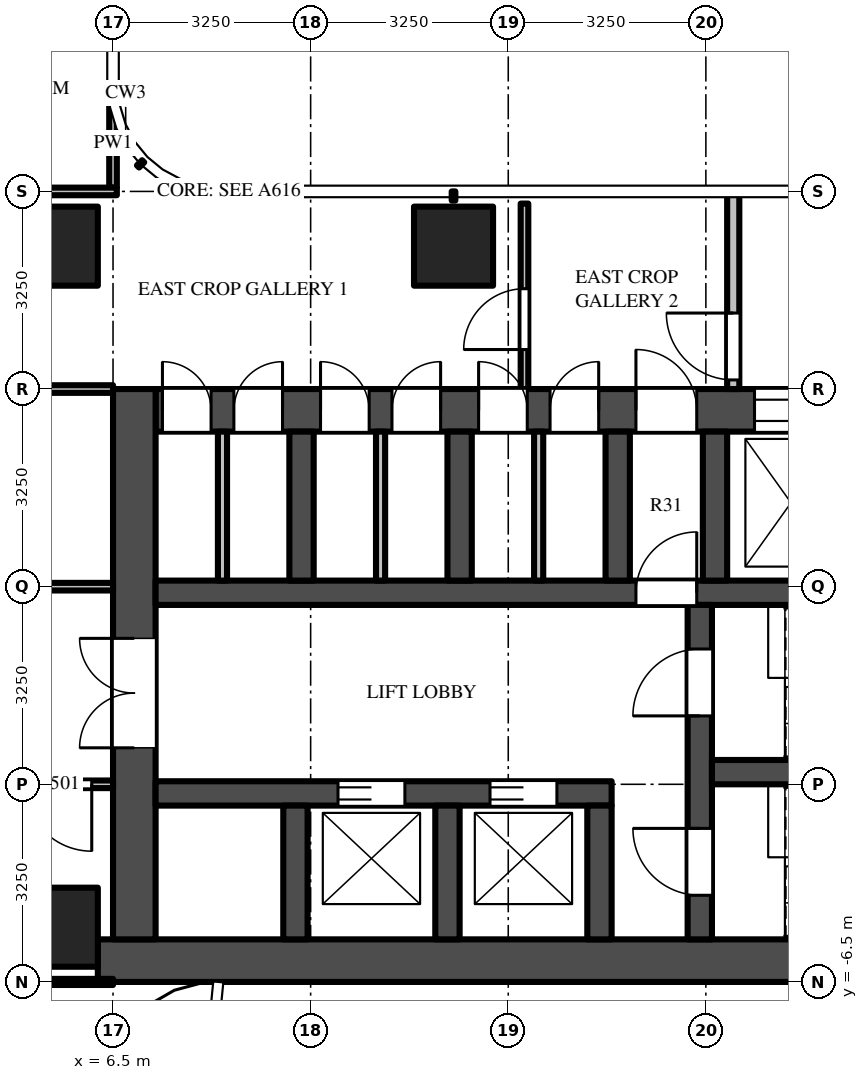
"""IFC4 building model, lengths in metres.
Left out: names, types, materials, properties, quantities, classifications, styles, units other than length and angle.
Written with IfcOpenShell. Run it as: python <this file> out.ifc"""

import sys

from ifc_helpers import new_model, si_unit, direction, frame, frame_2d, origin, origin_2d, place, context, subcontext, project, spatial, rectangle, extrude, source, transform, mapped, element, fill, save


model = new_model("IFC4")
c1 = context("Model", 3, precision=1e-05, world=origin(), true_north=direction((0.0, 1.0)))
c2 = subcontext(c1, "Body", "Model", "MODEL_VIEW")
j1 = project(units=[si_unit("LENGTHUNIT", "METRE"), si_unit("PLANEANGLEUNIT", "RADIAN")], contexts=[c1])
p1 = place(None, origin())
s1 = spatial("IfcSite", under=j1, at=p1, CompositionType="ELEMENT")
p2 = place(p1, origin())
s2 = spatial("IfcBuilding", under=s1, at=p2, CompositionType="ELEMENT")
p3 = place(p2, frame((0.0, 0.0, 138.0)))
s3 = spatial("IfcBuildingStorey", under=s2, at=p3, CompositionType="ELEMENT", Elevation=138.0)
m1 = source(origin(), c2, "Body", "SweptSolid", [
    extrude(rectangle(XDim=1.3, YDim=1.3, at=origin_2d()), origin(), (0.0, 0.0, 1.0), 4.5),
])
for number, where, z_axis, x_axis in (
    (1, (12.1, 5.6, 0.0), (0.0, 0.0, 1.0), (1.0, 0.0, 0.0)),
    (2, (5.6, 5.6, 0.0), (0.0, 0.0, 1.0), (1.0, 0.0, 0.0)),
    (3, (5.6, -5.6, 0.0), (0.0, 0.0, 1.0), (1.0, 0.0, 0.0)),
):
    element("IfcColumn", number, at=place(p3, frame(where, z_axis=z_axis, x_axis=x_axis)), inside=s3, PredefinedType="COLUMN", context=c2, shape_type="MappedRepresentation", body=[
        mapped(m1, transform((0.0, 0.0, 0.0))),
    ])
m2 = source(origin(), c2, "Body", "SweptSolid", [
    extrude(rectangle(XDim=16.5, YDim=0.7, at=frame_2d((8.25, 0.0))), origin(), (0.0, 0.0, 1.0), 4.25),
])
p4 = place(p3, frame((6.25, -6.15, 0.0), z_axis=(0.0, 0.0, 1.0), x_axis=(1.0, 0.0, 0.0)))
e4 = element("IfcWall", 4, at=p4, inside=s3, PredefinedType="SHEAR", context=c2, shape_type="MappedRepresentation", body=[
    mapped(m2, transform((0.0, 0.0, 0.0))),
])
m3 = source(origin(), c2, "Body", "SweptSolid", [
    extrude(rectangle(XDim=14.85, YDim=0.7, at=frame_2d((7.425, 0.0))), origin(), (0.0, 0.0, 1.0), 4.25),
])
p5 = place(p3, frame((7.2, 2.9, 0.0), z_axis=(0.0, 0.0, 1.0), x_axis=(1.0, 0.0, 0.0)))
e5 = element("IfcWall", 5, at=p5, inside=s3, PredefinedType="SHEAR", context=c2, shape_type="MappedRepresentation", body=[
    mapped(m3, transform((0.0, 0.0, 0.0))),
])
m4 = source(origin(), c2, "Body", "SweptSolid", [
    extrude(rectangle(XDim=1.3, YDim=2.1, at=frame_2d((0.65, 1.05))), frame((0.0, 0.36, 0.0), z_axis=(0.0, -1.0, 0.0), x_axis=(1.0, 0.0, 0.0)), (0.0, 0.0, 1.0), 0.72),
])
p6 = place(p5, frame((12.2, 0.0, 0.0)))
e6 = element("IfcOpeningElement", 6, at=p6, cuts=e5, PredefinedType="OPENING", context=c2, shape_type="MappedRepresentation", body=[
    mapped(m4, transform((0.0, 0.0, 0.0))),
])
m5 = source(origin(), c2, "Body", "SweptSolid", [
    extrude(rectangle(XDim=1.2, YDim=2.1, at=frame_2d((0.6, 1.05))), frame((0.0, 0.36, 0.0), z_axis=(0.0, -1.0, 0.0), x_axis=(1.0, 0.0, 0.0)), (0.0, 0.0, 1.0), 0.72),
])
p7 = place(p5, frame((9.85, 0.0, 0.0)))
e7 = element("IfcOpeningElement", 7, at=p7, cuts=e5, PredefinedType="OPENING", context=c2, shape_type="MappedRepresentation", body=[
    mapped(m5, transform((0.0, 0.0, 0.0))),
])
m6 = source(origin(), c2, "Body", "SweptSolid", [
    extrude(rectangle(XDim=1.0, YDim=2.1, at=frame_2d((0.5, 1.05))), frame((0.0, 0.36, 0.0), z_axis=(0.0, -1.0, 0.0), x_axis=(1.0, 0.0, 0.0)), (0.0, 0.0, 1.0), 0.72),
])
p8 = place(p5, frame((7.9, 0.0, 0.0)))
e8 = element("IfcOpeningElement", 8, at=p8, cuts=e5, PredefinedType="OPENING", context=c2, shape_type="MappedRepresentation", body=[
    mapped(m6, transform((0.0, 0.0, 0.0))),
])
m7 = source(origin(), c2, "Body", "SweptSolid", [
    extrude(rectangle(XDim=0.8, YDim=2.1, at=frame_2d((0.4, 1.05))), frame((0.0, 0.36, 0.0), z_axis=(0.0, -1.0, 0.0), x_axis=(1.0, 0.0, 0.0)), (0.0, 0.0, 1.0), 0.72),
])
p9 = place(p5, frame((0.113, 0.0, 0.0)))
e9 = element("IfcOpeningElement", 9, at=p9, cuts=e5, PredefinedType="OPENING", context=c2, shape_type="MappedRepresentation", body=[
    mapped(m7, transform((0.0, 0.0, 0.0))),
])
p10 = place(p5, frame((1.288, 0.0, 0.0)))
e10 = element("IfcOpeningElement", 10, at=p10, cuts=e5, PredefinedType="OPENING", context=c2, shape_type="MappedRepresentation", body=[
    mapped(m7, transform((0.0, 0.0, 0.0))),
])
p11 = place(p5, frame((2.712, 0.0, 0.0)))
e11 = element("IfcOpeningElement", 11, at=p11, cuts=e5, PredefinedType="OPENING", context=c2, shape_type="MappedRepresentation", body=[
    mapped(m7, transform((0.0, 0.0, 0.0))),
])
p12 = place(p5, frame((3.887, 0.0, 0.0)))
e12 = element("IfcOpeningElement", 12, at=p12, cuts=e5, PredefinedType="OPENING", context=c2, shape_type="MappedRepresentation", body=[
    mapped(m7, transform((0.0, 0.0, 0.0))),
])
p13 = place(p5, frame((5.312, 0.0, 0.0)))
e13 = element("IfcOpeningElement", 13, at=p13, cuts=e5, PredefinedType="OPENING", context=c2, shape_type="MappedRepresentation", body=[
    mapped(m7, transform((0.0, 0.0, 0.0))),
])
p14 = place(p5, frame((6.488, 0.0, 0.0)))
e14 = element("IfcOpeningElement", 14, at=p14, cuts=e5, PredefinedType="OPENING", context=c2, shape_type="MappedRepresentation", body=[
    mapped(m7, transform((0.0, 0.0, 0.0))),
])
m8 = source(origin(), c2, "Body", "SweptSolid", [
    extrude(rectangle(XDim=9.05, YDim=0.7, at=frame_2d((4.525, 0.0))), origin(), (0.0, 0.0, 1.0), 4.25),
])
p15 = place(p3, frame((6.85, -5.8, 0.0), z_axis=(0.0, 0.0, 1.0), x_axis=(0.0, 1.0, 0.0)))
e15 = element("IfcWall", 15, at=p15, inside=s3, PredefinedType="SHEAR", context=c2, shape_type="MappedRepresentation", body=[
    mapped(m8, transform((0.0, 0.0, 0.0))),
])
m9 = source(origin(), c2, "Body", "SweptSolid", [
    extrude(rectangle(XDim=1.8, YDim=2.1, at=frame_2d((0.9, 1.05))), frame((0.0, 0.36, 0.0), z_axis=(0.0, -1.0, 0.0), x_axis=(1.0, 0.0, 0.0)), (0.0, 0.0, 1.0), 0.72),
])
p16 = place(p15, frame((3.15, 0.0, 0.0)))
e16 = element("IfcOpeningElement", 16, at=p16, cuts=e15, PredefinedType="OPENING", context=c2, shape_type="MappedRepresentation", body=[
    mapped(m9, transform((0.0, 0.0, 0.0))),
])
m10 = source(origin(), c2, "Body", "SweptSolid", [
    extrude(rectangle(XDim=7.5, YDim=0.4, at=frame_2d((3.75, 0.0))), origin(), (0.0, 0.0, 1.0), 4.25),
])
p17 = place(p3, frame((7.2, -3.4, 0.0), z_axis=(0.0, 0.0, 1.0), x_axis=(1.0, 0.0, 0.0)))
e17 = element("IfcWall", 17, at=p17, inside=s3, PredefinedType="SHEAR", context=c2, shape_type="MappedRepresentation", body=[
    mapped(m10, transform((0.0, 0.0, 0.0))),
])
m11 = source(origin(), c2, "Body", "SweptSolid", [
    extrude(rectangle(XDim=1.1, YDim=2.1, at=frame_2d((0.55, 1.05))), frame((0.0, 0.21, 0.0), z_axis=(0.0, -1.0, 0.0), x_axis=(1.0, 0.0, 0.0)), (0.0, 0.0, 1.0), 0.42),
])
p18 = place(p17, frame((3.0, 0.0, 0.0)))
e18 = element("IfcOpeningElement", 18, at=p18, cuts=e17, PredefinedType="OPENING", context=c2, shape_type="MappedRepresentation", body=[
    mapped(m11, transform((0.0, 0.0, 0.0))),
])
p19 = place(p17, frame((5.5, 0.0, 0.0)))
e19 = element("IfcOpeningElement", 19, at=p19, cuts=e17, PredefinedType="OPENING", context=c2, shape_type="MappedRepresentation", body=[
    mapped(m11, transform((0.0, 0.0, 0.0))),
])
m12 = source(origin(), c2, "Body", "SweptSolid", [
    extrude(rectangle(XDim=14.85, YDim=0.4, at=frame_2d((7.425, 0.0))), origin(), (0.0, 0.0, 1.0), 4.25),
])
p20 = place(p3, frame((7.2, -0.1, 0.0), z_axis=(0.0, 0.0, 1.0), x_axis=(1.0, 0.0, 0.0)))
e20 = element("IfcWall", 20, at=p20, inside=s3, PredefinedType="SHEAR", context=c2, shape_type="MappedRepresentation", body=[
    mapped(m12, transform((0.0, 0.0, 0.0))),
])
m13 = source(origin(), c2, "Body", "SweptSolid", [
    extrude(rectangle(XDim=1.0, YDim=2.1, at=frame_2d((0.5, 1.05))), frame((0.0, 0.21, 0.0), z_axis=(0.0, -1.0, 0.0), x_axis=(1.0, 0.0, 0.0)), (0.0, 0.0, 1.0), 0.42),
])
p21 = place(p20, frame((7.9, 0.0, 0.0)))
e21 = element("IfcOpeningElement", 21, at=p21, cuts=e20, PredefinedType="OPENING", context=c2, shape_type="MappedRepresentation", body=[
    mapped(m13, transform((0.0, 0.0, 0.0))),
])
m14 = source(origin(), c2, "Body", "SweptSolid", [
    extrude(rectangle(XDim=5.5, YDim=0.4, at=frame_2d((2.75, 0.0))), origin(), (0.0, 0.0, 1.0), 4.25),
])
p22 = place(p3, frame((16.15, -5.8, 0.0), z_axis=(0.0, 0.0, 1.0), x_axis=(0.0, 1.0, 0.0)))
e22 = element("IfcWall", 22, at=p22, inside=s3, PredefinedType="SHEAR", context=c2, shape_type="MappedRepresentation", body=[
    mapped(m14, transform((0.0, 0.0, 0.0))),
])
p23 = place(p22, frame((0.725, 0.0, 0.0)))
e23 = element("IfcOpeningElement", 23, at=p23, cuts=e22, PredefinedType="OPENING", context=c2, shape_type="MappedRepresentation", body=[
    mapped(m11, transform((0.0, 0.0, 0.0))),
])
p24 = place(p22, frame((3.675, 0.0, 0.0)))
e24 = element("IfcOpeningElement", 24, at=p24, cuts=e22, PredefinedType="OPENING", context=c2, shape_type="MappedRepresentation", body=[
    mapped(m11, transform((0.0, 0.0, 0.0))),
])
m15 = source(origin(), c2, "Body", "SweptSolid", [
    extrude(rectangle(XDim=5.7, YDim=0.4, at=frame_2d((2.85, 0.0))), origin(), (0.0, 0.0, 1.0), 4.25),
])
p25 = place(p3, frame((16.35, -3.05, 0.0), z_axis=(0.0, 0.0, 1.0), x_axis=(1.0, 0.0, 0.0)))
e25 = element("IfcWall", 25, at=p25, inside=s3, PredefinedType="SHEAR", context=c2, shape_type="MappedRepresentation", body=[
    mapped(m15, transform((0.0, 0.0, 0.0))),
])
m16 = source(origin(), c2, "Body", "SweptSolid", [
    extrude(rectangle(XDim=2.2, YDim=0.4, at=frame_2d((1.1, 0.0))), origin(), (0.0, 0.0, 1.0), 4.25),
])
for number, where, z_axis, x_axis in (
    (26, (9.5, -5.8, 0.0), (0.0, 0.0, 1.0), (0.0, 1.0, 0.0)),
    (27, (12.0, -5.8, 0.0), (0.0, 0.0, 1.0), (0.0, 1.0, 0.0)),
    (28, (14.5, -5.8, 0.0), (0.0, 0.0, 1.0), (0.0, 1.0, 0.0)),
):
    element("IfcWall", number, at=place(p3, frame(where, z_axis=z_axis, x_axis=x_axis)), inside=s3, PredefinedType="SHEAR", context=c2, shape_type="MappedRepresentation", body=[
        mapped(m16, transform((0.0, 0.0, 0.0))),
    ])
m17 = source(origin(), c2, "Body", "SweptSolid", [
    extrude(rectangle(XDim=2.45, YDim=0.4, at=frame_2d((1.225, 0.0))), origin(), (0.0, 0.0, 1.0), 4.25),
])
for number, where, z_axis, x_axis in (
    (29, (9.6, 0.1, 0.0), (0.0, 0.0, 1.0), (0.0, 1.0, 0.0)),
    (30, (12.2, 0.1, 0.0), (0.0, 0.0, 1.0), (0.0, 1.0, 0.0)),
    (31, (14.8, 0.1, 0.0), (0.0, 0.0, 1.0), (0.0, 1.0, 0.0)),
    (32, (16.4, 0.1, 0.0), (0.0, 0.0, 1.0), (0.0, 1.0, 0.0)),
):
    element("IfcWall", number, at=place(p3, frame(where, z_axis=z_axis, x_axis=x_axis)), inside=s3, PredefinedType="SHEAR", context=c2, shape_type="MappedRepresentation", body=[
        mapped(m17, transform((0.0, 0.0, 0.0))),
    ])
m18 = source(origin(), c2, "Body", "SweptSolid", [
    extrude(rectangle(XDim=3.25, YDim=0.2, at=frame_2d((1.625, 0.0))), origin(), (0.0, 0.0, 1.0), 4.25),
])
p26 = place(p3, frame((16.7, 3.25, 0.0), z_axis=(0.0, 0.0, 1.0), x_axis=(0.0, 1.0, 0.0)))
e33 = element("IfcWall", 33, at=p26, inside=s3, PredefinedType="PARTITIONING", context=c2, shape_type="MappedRepresentation", body=[
    mapped(m18, transform((0.0, 0.0, 0.0))),
])
m19 = source(origin(), c2, "Body", "SweptSolid", [
    extrude(rectangle(XDim=1.1, YDim=2.1, at=frame_2d((0.55, 1.05))), frame((0.0, 0.11, 0.0), z_axis=(0.0, -1.0, 0.0), x_axis=(1.0, 0.0, 0.0)), (0.0, 0.0, 1.0), 0.22),
])
p27 = place(p26, frame((0.15, 0.0, 0.0)))
e34 = element("IfcOpeningElement", 34, at=p27, cuts=e33, PredefinedType="OPENING", context=c2, shape_type="MappedRepresentation", body=[
    mapped(m19, transform((0.0, 0.0, 0.0))),
])
m20 = source(origin(), c2, "Body", "SweptSolid", [
    extrude(rectangle(XDim=2.45, YDim=0.15, at=frame_2d((1.225, 0.0))), origin(), (0.0, 0.0, 1.0), 4.25),
])
for number, where, z_axis, x_axis in (
    (35, (8.3, 0.1, 0.0), (0.0, 0.0, 1.0), (0.0, 1.0, 0.0)),
    (36, (10.9, 0.1, 0.0), (0.0, 0.0, 1.0), (0.0, 1.0, 0.0)),
    (37, (13.5, 0.1, 0.0), (0.0, 0.0, 1.0), (0.0, 1.0, 0.0)),
):
    element("IfcWall", number, at=place(p3, frame(where, z_axis=z_axis, x_axis=x_axis)), inside=s3, PredefinedType="PARTITIONING", context=c2, shape_type="MappedRepresentation", body=[
        mapped(m20, transform((0.0, 0.0, 0.0))),
    ])
m21 = source(origin(), c2, "Body", "SweptSolid", [
    extrude(rectangle(XDim=1.469, YDim=0.125, at=frame_2d((0.734, 0.0))), origin(), (0.0, 0.0, 1.0), 4.25),
])
p28 = place(p3, frame((6.5, 6.562, 0.0), z_axis=(0.0, 0.0, 1.0), x_axis=(0.0, 1.0, 0.0)))
e38 = element("IfcWall", 38, at=p28, inside=s3, PredefinedType="PARTITIONING", context=c2, shape_type="MappedRepresentation", body=[
    mapped(m21, transform((0.0, 0.0, 0.0))),
])
m22 = source(origin(), c2, "Body", "SweptSolid", [
    extrude(rectangle(XDim=3.05, YDim=0.125, at=frame_2d((1.525, 0.0))), origin(), (0.0, 0.0, 1.0), 3.33),
])
p29 = place(p3, frame((13.267, 3.25, 0.0), z_axis=(0.0, 0.0, 1.0), x_axis=(0.0, 1.0, 0.0)))
e39 = element("IfcWall", 39, at=p29, inside=s3, PredefinedType="PARTITIONING", context=c2, shape_type="MappedRepresentation", body=[
    mapped(m22, transform((0.0, 0.0, 0.0))),
])
m23 = source(origin(), c2, "Body", "SweptSolid", [
    extrude(rectangle(XDim=1.0, YDim=2.1, at=frame_2d((0.5, 1.05))), frame((0.0, 0.073, 0.0), z_axis=(0.0, -1.0, 0.0), x_axis=(1.0, 0.0, 0.0)), (0.0, 0.0, 1.0), 0.145),
])
p30 = place(p29, frame((0.65, 0.0, 0.0)))
e40 = element("IfcOpeningElement", 40, at=p30, cuts=e39, PredefinedType="OPENING", context=c2, shape_type="MappedRepresentation", body=[
    mapped(m23, transform((0.0, 0.0, 0.0))),
])
m24 = source(origin(), c2, "Body", "SweptSolid", [
    extrude(rectangle(XDim=5.238, YDim=0.1, at=frame_2d((2.619, 0.0))), origin(), (0.0, 0.0, 1.0), 3.33),
])
p31 = place(p3, frame((1.262, -6.5, 0.0), z_axis=(0.0, 0.0, 1.0), x_axis=(1.0, 0.0, 0.0)))
e41 = element("IfcWall", 41, at=p31, inside=s3, PredefinedType="PARTITIONING", context=c2, shape_type="MappedRepresentation", body=[
    mapped(m24, transform((0.0, 0.0, 0.0))),
])
m25 = source(origin(), c2, "Body", "SweptSolid", [
    extrude(rectangle(XDim=5.363, YDim=0.125, at=frame_2d((2.681, 0.0))), origin(), (0.0, 0.0, 1.0), 3.468),
])
p32 = place(p3, frame((6.5, -3.25, 0.0), z_axis=(0.0, 0.0, 1.0), x_axis=(-1.0, 0.0, 0.0)))
e42 = element("IfcWall", 42, at=p32, inside=s3, PredefinedType="PARTITIONING", context=c2, shape_type="MappedRepresentation", body=[
    mapped(m25, transform((0.0, 0.0, 0.0))),
])
m26 = source(origin(), c2, "Body", "SweptSolid", [
    extrude(rectangle(XDim=1.1, YDim=2.1, at=frame_2d((0.55, 1.05))), frame((0.0, 0.073, 0.0), z_axis=(0.0, -1.0, 0.0), x_axis=(1.0, 0.0, 0.0)), (0.0, 0.0, 1.0), 0.145),
])
p33 = place(p32, frame((0.35, 0.0, 0.0)))
e43 = element("IfcOpeningElement", 43, at=p33, cuts=e42, PredefinedType="OPENING", context=c2, shape_type="MappedRepresentation", body=[
    mapped(m26, transform((0.0, 0.0, 0.0))),
])
p34 = place(p3, frame((6.5, 0.0, 0.0), z_axis=(0.0, 0.0, 1.0), x_axis=(-1.0, 0.0, 0.0)))
e44 = element("IfcWall", 44, at=p34, inside=s3, PredefinedType="PARTITIONING", context=c2, shape_type="MappedRepresentation", body=[
    mapped(m25, transform((0.0, 0.0, 0.0))),
])
p35 = place(p34, frame((3.95, 0.0, 0.0)))
e45 = element("IfcOpeningElement", 45, at=p35, cuts=e44, PredefinedType="OPENING", context=c2, shape_type="MappedRepresentation", body=[
    mapped(m23, transform((0.0, 0.0, 0.0))),
])
p36 = place(p3, frame((1.137, 3.25, 0.0), z_axis=(0.0, 0.0, 1.0), x_axis=(1.0, 0.0, 0.0)))
e46 = element("IfcWall", 46, at=p36, inside=s3, PredefinedType="PARTITIONING", context=c2, shape_type="MappedRepresentation", body=[
    mapped(m25, transform((0.0, 0.0, 0.0))),
])
m27 = source(origin(), c2, "Body", "SweptSolid", [
    extrude(rectangle(XDim=5.425, YDim=0.125, at=frame_2d((2.712, 0.0))), origin(), (0.0, 0.0, 1.0), 3.33),
])
p37 = place(p3, frame((1.137, 6.5, 0.0), z_axis=(0.0, 0.0, 1.0), x_axis=(1.0, 0.0, 0.0)))
e47 = element("IfcWall", 47, at=p37, inside=s3, PredefinedType="PARTITIONING", context=c2, shape_type="MappedRepresentation", body=[
    mapped(m27, transform((0.0, 0.0, 0.0))),
])
m28 = source(origin(), c2, "Body", "SweptSolid", [
    extrude(rectangle(XDim=1.1, YDim=2.1, at=frame_2d((0.55, 1.05))), frame((0.0, 0.025, 0.0), z_axis=(0.0, -1.0, 0.0), x_axis=(1.0, 0.0, 0.0)), (0.0, 0.0, 1.0), 0.05),
])
p38 = place(p18, origin())
e48 = element("IfcDoor", 48, at=p38, inside=s3, OperationType="DOUBLE_DOOR_SLIDING", PredefinedType="DOOR", context=c2, shape_type="MappedRepresentation", body=[
    mapped(m28, transform((0.0, 0.0, 0.0))),
])
fill(e18, e48)
p39 = place(p19, origin())
e49 = element("IfcDoor", 49, at=p39, inside=s3, OperationType="DOUBLE_DOOR_SLIDING", PredefinedType="DOOR", context=c2, shape_type="MappedRepresentation", body=[
    mapped(m28, transform((0.0, 0.0, 0.0))),
])
fill(e19, e49)
m29 = source(origin(), c2, "Body", "SweptSolid", [
    extrude(rectangle(XDim=1.2, YDim=2.1, at=frame_2d((0.6, 1.05))), frame((0.0, -0.275, 0.0), z_axis=(0.0, -1.0, 0.0), x_axis=(1.0, 0.0, 0.0)), (0.0, 0.0, 1.0), 0.05),
])
p40 = place(p7, origin())
e50 = element("IfcDoor", 50, at=p40, inside=s3, OperationType="DOUBLE_DOOR_SLIDING", PredefinedType="DOOR", context=c2, shape_type="MappedRepresentation", body=[
    mapped(m29, transform((0.0, 0.0, 0.0))),
])
fill(e7, e50)
m30 = source(origin(), c2, "Body", "SweptSolid", [
    extrude(rectangle(XDim=1.8, YDim=2.1, at=frame_2d((0.9, 1.05))), frame((0.0, -0.275, 0.0), z_axis=(0.0, -1.0, 0.0), x_axis=(1.0, 0.0, 0.0)), (0.0, 0.0, 1.0), 0.05),
])
p41 = place(p16, origin())
e51 = element("IfcDoor", 51, at=p41, inside=s3, OperationType="DOUBLE_DOOR_SINGLE_SWING", PredefinedType="DOOR", context=c2, shape_type="MappedRepresentation", body=[
    mapped(m30, transform((0.0, 0.0, 0.0))),
])
fill(e16, e51)
p42 = place(p23, origin())
e52 = element("IfcDoor", 52, at=p42, inside=s3, OperationType="SINGLE_SWING_RIGHT", PredefinedType="DOOR", context=c2, shape_type="MappedRepresentation", body=[
    mapped(m28, transform((0.0, 0.0, 0.0))),
])
fill(e23, e52)
p43 = place(p24, origin())
e53 = element("IfcDoor", 53, at=p43, inside=s3, OperationType="SINGLE_SWING_LEFT", PredefinedType="DOOR", context=c2, shape_type="MappedRepresentation", body=[
    mapped(m28, transform((0.0, 0.0, 0.0))),
])
fill(e24, e53)
m31 = source(origin(), c2, "Body", "SweptSolid", [
    extrude(rectangle(XDim=1.0, YDim=2.1, at=frame_2d((0.5, 1.05))), frame((0.0, 0.025, 0.0), z_axis=(0.0, -1.0, 0.0), x_axis=(1.0, 0.0, 0.0)), (0.0, 0.0, 1.0), 0.05),
])
p44 = place(p21, origin())
e54 = element("IfcDoor", 54, at=p44, inside=s3, OperationType="SINGLE_SWING_RIGHT", PredefinedType="DOOR", context=c2, shape_type="MappedRepresentation", body=[
    mapped(m31, transform((0.0, 0.0, 0.0))),
])
fill(e21, e54)
m32 = source(origin(), c2, "Body", "SweptSolid", [
    extrude(rectangle(XDim=1.0, YDim=2.1, at=frame_2d((0.5, 1.05))), frame((0.0, -0.275, 0.0), z_axis=(0.0, -1.0, 0.0), x_axis=(1.0, 0.0, 0.0)), (0.0, 0.0, 1.0), 0.05),
])
p45 = place(p8, origin())
e55 = element("IfcDoor", 55, at=p45, inside=s3, OperationType="SINGLE_SWING_LEFT", PredefinedType="DOOR", context=c2, shape_type="MappedRepresentation", body=[
    mapped(m32, transform((0.0, 0.0, 0.0))),
])
fill(e8, e55)
p46 = place(p27, origin())
e56 = element("IfcDoor", 56, at=p46, inside=s3, OperationType="SINGLE_SWING_RIGHT", PredefinedType="DOOR", context=c2, shape_type="MappedRepresentation", body=[
    mapped(m28, transform((0.0, 0.0, 0.0))),
])
fill(e34, e56)
m33 = source(origin(), c2, "Body", "SweptSolid", [
    extrude(rectangle(XDim=0.8, YDim=2.1, at=frame_2d((0.4, 1.05))), frame((0.0, -0.275, 0.0), z_axis=(0.0, -1.0, 0.0), x_axis=(1.0, 0.0, 0.0)), (0.0, 0.0, 1.0), 0.05),
])
p47 = place(p9, origin())
e57 = element("IfcDoor", 57, at=p47, inside=s3, OperationType="SINGLE_SWING_LEFT", PredefinedType="DOOR", context=c2, shape_type="MappedRepresentation", body=[
    mapped(m33, transform((0.0, 0.0, 0.0))),
])
fill(e9, e57)
p48 = place(p10, origin())
e58 = element("IfcDoor", 58, at=p48, inside=s3, OperationType="SINGLE_SWING_RIGHT", PredefinedType="DOOR", context=c2, shape_type="MappedRepresentation", body=[
    mapped(m33, transform((0.0, 0.0, 0.0))),
])
fill(e10, e58)
p49 = place(p11, origin())
e59 = element("IfcDoor", 59, at=p49, inside=s3, OperationType="SINGLE_SWING_LEFT", PredefinedType="DOOR", context=c2, shape_type="MappedRepresentation", body=[
    mapped(m33, transform((0.0, 0.0, 0.0))),
])
fill(e11, e59)
p50 = place(p12, origin())
e60 = element("IfcDoor", 60, at=p50, inside=s3, OperationType="SINGLE_SWING_RIGHT", PredefinedType="DOOR", context=c2, shape_type="MappedRepresentation", body=[
    mapped(m33, transform((0.0, 0.0, 0.0))),
])
fill(e12, e60)
p51 = place(p13, origin())
e61 = element("IfcDoor", 61, at=p51, inside=s3, OperationType="SINGLE_SWING_LEFT", PredefinedType="DOOR", context=c2, shape_type="MappedRepresentation", body=[
    mapped(m33, transform((0.0, 0.0, 0.0))),
])
fill(e13, e61)
p52 = place(p14, origin())
e62 = element("IfcDoor", 62, at=p52, inside=s3, OperationType="SINGLE_SWING_RIGHT", PredefinedType="DOOR", context=c2, shape_type="MappedRepresentation", body=[
    mapped(m33, transform((0.0, 0.0, 0.0))),
])
fill(e14, e62)
p53 = place(p33, origin())
e63 = element("IfcDoor", 63, at=p53, inside=s3, OperationType="SINGLE_SWING_LEFT", PredefinedType="DOOR", context=c2, shape_type="MappedRepresentation", body=[
    mapped(m28, transform((0.0, 0.0, 0.0))),
])
fill(e43, e63)
p54 = place(p30, origin())
e64 = element("IfcDoor", 64, at=p54, inside=s3, OperationType="SINGLE_SWING_LEFT", PredefinedType="DOOR", context=c2, shape_type="MappedRepresentation", body=[
    mapped(m31, transform((0.0, 0.0, 0.0))),
])
fill(e40, e64)
save(model, sys.argv[1])
